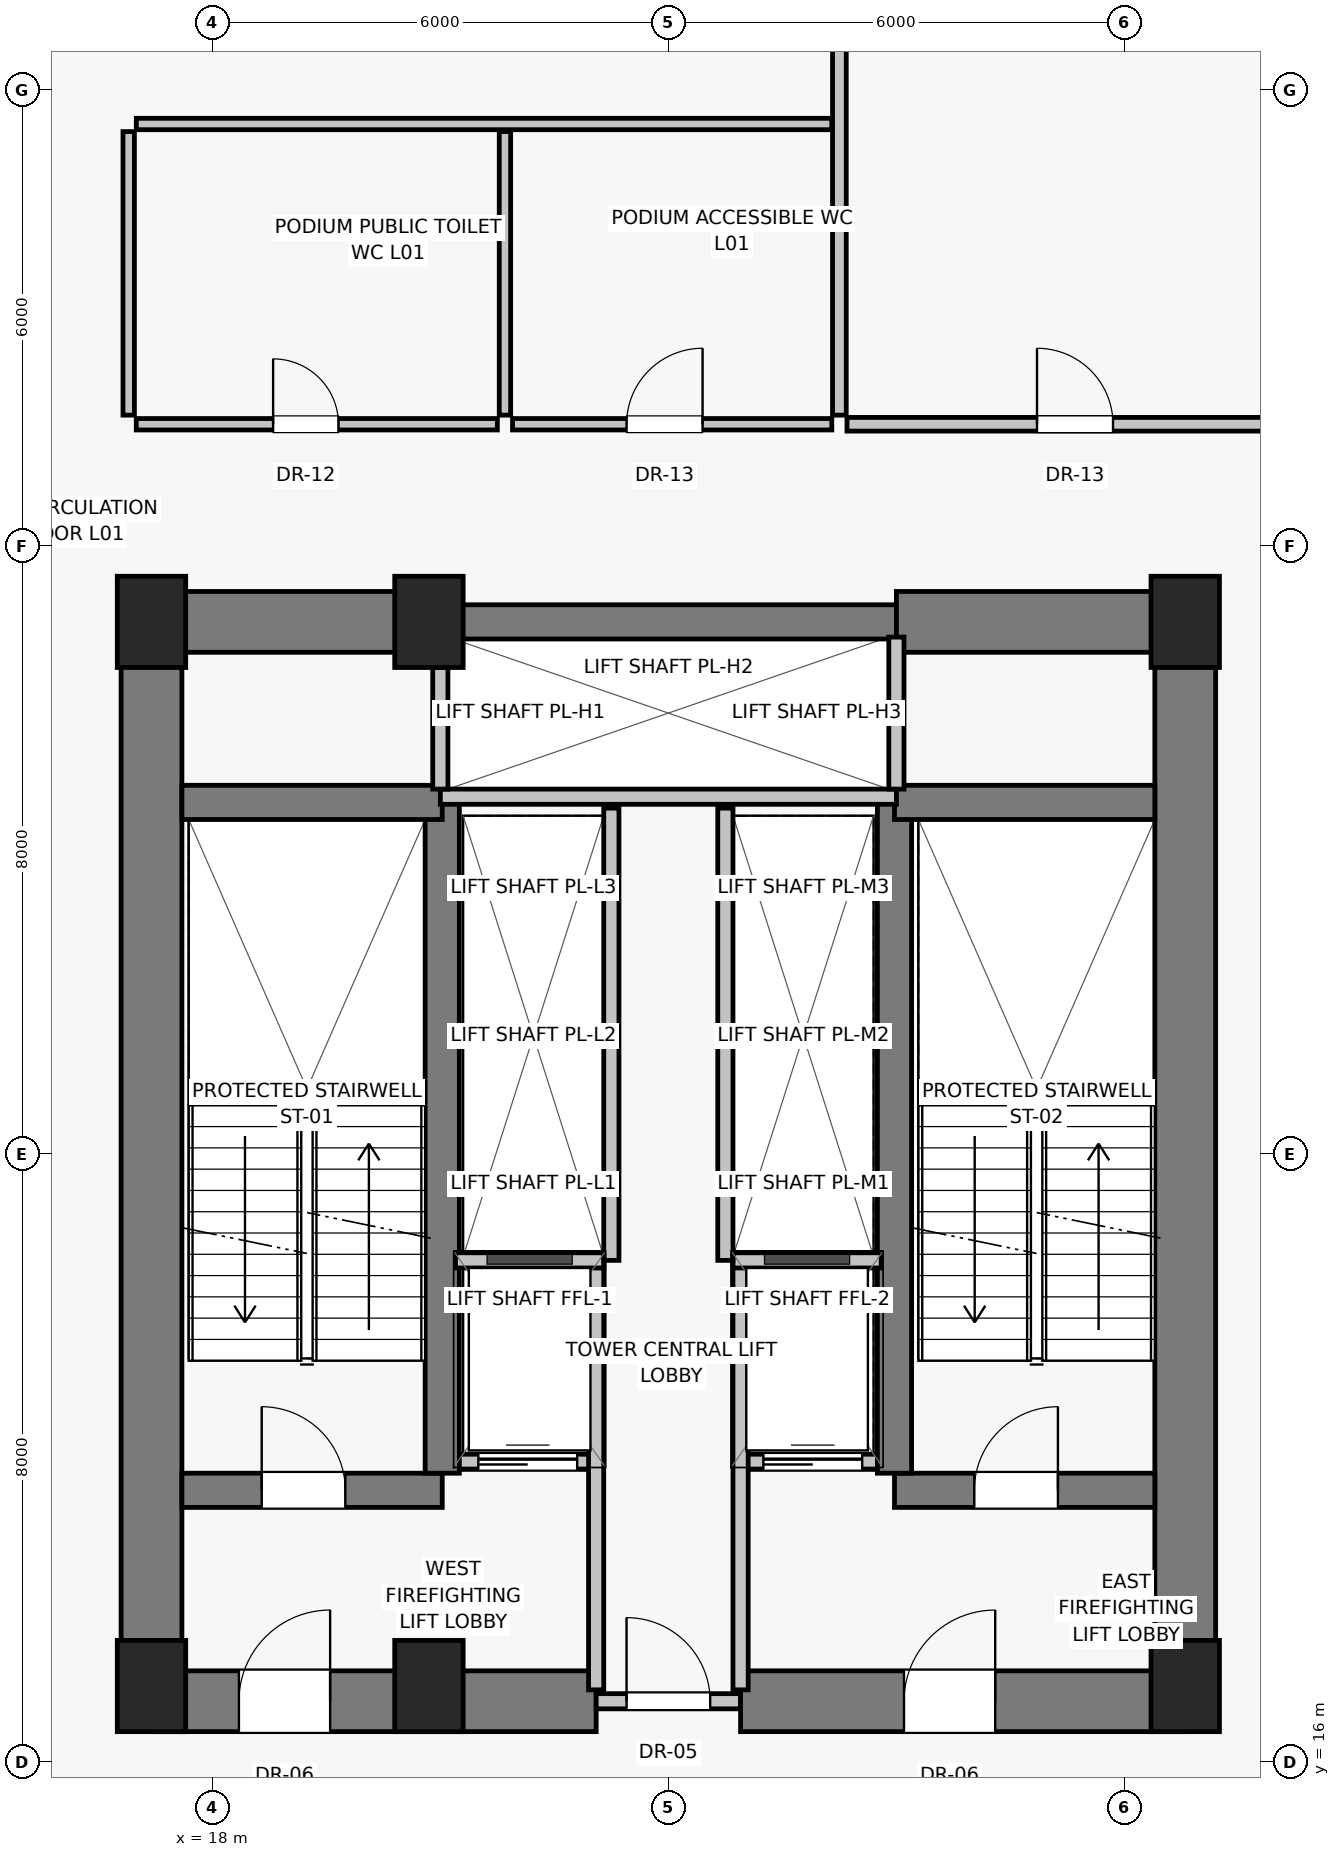
"""IFC4 building model, lengths in metres.
Left out: names, types, materials, properties, quantities, classifications, styles, units other than length and angle.
Written with IfcOpenShell. Run it as: python <this file> out.ifc"""

import sys

from ifc_helpers import new_model, si_unit, direction, frame, frame_2d, origin, origin_2d, place, context, subcontext, project, spatial, rectangle, extrude, source, transform, mapped, element, fill, save


model = new_model("IFC4")
c1 = context("Model", 3, precision=1e-05, world=origin(), true_north=direction((0.0, 1.0)))
c2 = subcontext(c1, "Body", "Model", "MODEL_VIEW")
j1 = project(units=[si_unit("LENGTHUNIT", "METRE"), si_unit("PLANEANGLEUNIT", "RADIAN")], contexts=[c1])
p1 = place(None, origin())
s1 = spatial("IfcSite", under=j1, at=p1, CompositionType="ELEMENT")
p2 = place(p1, origin())
s2 = spatial("IfcBuilding", under=s1, at=p2, CompositionType="ELEMENT")
p3 = place(p2, frame((0.0, 0.0, 5.2)))
s3 = spatial("IfcBuildingStorey", under=s2, at=p3, CompositionType="ELEMENT", Elevation=5.2)
for number, where, z_axis, x_axis in (
    (1, (17.2, 17.0, 0.0), (0.0, 0.0, 1.0), (1.0, 0.0, 0.0)),
    (2, (20.85, 17.0, 0.0), (0.0, 0.0, 1.0), (1.0, 0.0, 0.0)),
    (3, (30.8, 17.0, 0.0), (0.0, 0.0, 1.0), (1.0, 0.0, 0.0)),
    (4, (17.2, 31.0, 0.0), (0.0, 0.0, 1.0), (1.0, 0.0, 0.0)),
    (5, (20.85, 31.0, 0.0), (0.0, 0.0, 1.0), (1.0, 0.0, 0.0)),
    (6, (30.8, 31.0, 0.0), (0.0, 0.0, 1.0), (1.0, 0.0, 0.0)),
):
    element("IfcColumn", number, at=place(p3, frame(where, z_axis=z_axis, x_axis=x_axis)), inside=s3, PredefinedType="PILASTER", context=c2, shape_type="SweptSolid", body=[
        extrude(rectangle(XDim=0.9, YDim=1.2, at=origin_2d()), origin(), (0.0, 0.0, 1.0), 4.4),
    ])
for number, where, z_axis, x_axis in (
    (7, (17.2, 16.8, 0.0), (0.0, 0.0, 1.0), (0.0, 1.0, 0.0)),
    (8, (30.8, 16.8, 0.0), (0.0, 0.0, 1.0), (0.0, 1.0, 0.0)),
):
    element("IfcWall", number, at=place(p3, frame(where, z_axis=z_axis, x_axis=x_axis)), inside=s3, PredefinedType="SHEAR", context=c2, shape_type="SweptSolid", body=[
        extrude(rectangle(XDim=14.2, YDim=0.8, at=frame_2d((7.1, 0.0))), origin(), (0.0, 0.0, 1.0), 4.1),
    ])
p4 = place(p3, frame((17.2, 16.8, 0.0), z_axis=(0.0, 0.0, 1.0), x_axis=(1.0, 0.0, 0.0)))
e9 = element("IfcWall", 9, at=p4, inside=s3, PredefinedType="SHEAR", context=c2, shape_type="SweptSolid", body=[
    extrude(rectangle(XDim=5.85, YDim=0.8, at=frame_2d((2.925, 0.0))), origin(), (0.0, 0.0, 1.0), 4.1),
])
p5 = place(p4, frame((1.15, 0.0, 0.0)))
e10 = element("IfcOpeningElement", 10, at=p5, cuts=e9, PredefinedType="OPENING", context=c2, shape_type="SweptSolid", body=[
    extrude(rectangle(XDim=1.2, YDim=2.03, at=frame_2d((0.6, 1.015))), frame((0.0, 0.41, 0.0), z_axis=(0.0, -1.0, 0.0), x_axis=(1.0, 0.0, 0.0)), (0.0, 0.0, 1.0), 0.82),
])
p6 = place(p3, frame((23.05, 16.8, 0.0), z_axis=(0.0, 0.0, 1.0), x_axis=(1.0, 0.0, 0.0)))
e11 = element("IfcWall", 11, at=p6, inside=s3, PredefinedType="SOLIDWALL", context=c2, shape_type="SweptSolid", body=[
    extrude(rectangle(XDim=1.9, YDim=0.2, at=frame_2d((0.95, 0.0))), origin(), (0.0, 0.0, 1.0), 3.25),
])
p7 = place(p6, frame((0.4, 0.0, 0.0)))
e12 = element("IfcOpeningElement", 12, at=p7, cuts=e11, PredefinedType="OPENING", context=c2, shape_type="SweptSolid", body=[
    extrude(rectangle(XDim=1.1, YDim=2.03, at=frame_2d((0.55, 1.015))), frame((0.0, 0.11, 0.0), z_axis=(0.0, -1.0, 0.0), x_axis=(1.0, 0.0, 0.0)), (0.0, 0.0, 1.0), 0.22),
])
p8 = place(p3, frame((24.95, 16.8, 0.0), z_axis=(0.0, 0.0, 1.0), x_axis=(1.0, 0.0, 0.0)))
e13 = element("IfcWall", 13, at=p8, inside=s3, PredefinedType="SHEAR", context=c2, shape_type="SweptSolid", body=[
    extrude(rectangle(XDim=5.85, YDim=0.8, at=frame_2d((2.925, 0.0))), origin(), (0.0, 0.0, 1.0), 4.1),
])
p9 = place(p8, frame((2.15, 0.0, 0.0)))
e14 = element("IfcOpeningElement", 14, at=p9, cuts=e13, PredefinedType="OPENING", context=c2, shape_type="SweptSolid", body=[
    extrude(rectangle(XDim=1.2, YDim=2.03, at=frame_2d((0.6, 1.015))), frame((0.0, 0.41, 0.0), z_axis=(0.0, -1.0, 0.0), x_axis=(1.0, 0.0, 0.0)), (0.0, 0.0, 1.0), 0.82),
])
p10 = place(p3, frame((17.2, 31.0, 0.0), z_axis=(0.0, 0.0, 1.0), x_axis=(1.0, 0.0, 0.0)))
e15 = element("IfcWall", 15, at=p10, inside=s3, PredefinedType="SHEAR", context=c2, shape_type="SweptSolid", body=[
    extrude(rectangle(XDim=3.8, YDim=0.8, at=frame_2d((1.9, 0.0))), origin(), (0.0, 0.0, 1.0), 4.1),
])
p11 = place(p3, frame((21.0, 31.0, 0.0), z_axis=(0.0, 0.0, 1.0), x_axis=(1.0, 0.0, 0.0)))
e16 = element("IfcWall", 16, at=p11, inside=s3, PredefinedType="SHEAR", context=c2, shape_type="SweptSolid", body=[
    extrude(rectangle(XDim=6.0, YDim=0.45, at=frame_2d((3.0, 0.0))), origin(), (0.0, 0.0, 1.0), 4.1),
])
p12 = place(p3, frame((27.0, 31.0, 0.0), z_axis=(0.0, 0.0, 1.0), x_axis=(1.0, 0.0, 0.0)))
e17 = element("IfcWall", 17, at=p12, inside=s3, PredefinedType="SHEAR", context=c2, shape_type="SweptSolid", body=[
    extrude(rectangle(XDim=3.8, YDim=0.8, at=frame_2d((1.9, 0.0))), origin(), (0.0, 0.0, 1.0), 4.1),
])
p13 = place(p3, frame((17.6, 19.575, 0.0), z_axis=(0.0, 0.0, 1.0), x_axis=(1.0, 0.0, 0.0)))
e18 = element("IfcWall", 18, at=p13, inside=s3, PredefinedType="SHEAR", context=c2, shape_type="SweptSolid", body=[
    extrude(rectangle(XDim=3.425, YDim=0.45, at=frame_2d((1.712, 0.0))), origin(), (0.0, 0.0, 1.0), 4.1),
])
p14 = place(p13, frame((1.05, 0.0, 0.0)))
e19 = element("IfcOpeningElement", 19, at=p14, cuts=e18, PredefinedType="OPENING", context=c2, shape_type="SweptSolid", body=[
    extrude(rectangle(XDim=1.1, YDim=2.03, at=frame_2d((0.55, 1.015))), frame((0.0, 0.235, 0.0), z_axis=(0.0, -1.0, 0.0), x_axis=(1.0, 0.0, 0.0)), (0.0, 0.0, 1.0), 0.47),
])
p15 = place(p3, frame((21.2, 19.95, 0.0), z_axis=(0.0, 0.0, 1.0), x_axis=(1.0, 0.0, 0.0)))
e20 = element("IfcWall", 20, at=p15, inside=s3, PredefinedType="SOLIDWALL", context=c2, shape_type="SweptSolid", body=[
    extrude(rectangle(XDim=1.85, YDim=0.2, at=frame_2d((0.925, 0.0))), origin(), (0.0, 0.0, 1.0), 4.1),
])
p16 = place(p15, frame((0.3, 0.0, 0.0)))
e21 = element("IfcOpeningElement", 21, at=p16, cuts=e20, PredefinedType="OPENING", context=c2, shape_type="SweptSolid", body=[
    extrude(rectangle(XDim=1.3, YDim=2.25, at=frame_2d((0.65, 1.125))), frame((0.0, 0.11, 0.0), z_axis=(0.0, -1.0, 0.0), x_axis=(1.0, 0.0, 0.0)), (0.0, 0.0, 1.0), 0.22),
])
p17 = place(p3, frame((24.95, 19.95, 0.0), z_axis=(0.0, 0.0, 1.0), x_axis=(1.0, 0.0, 0.0)))
e22 = element("IfcWall", 22, at=p17, inside=s3, PredefinedType="SOLIDWALL", context=c2, shape_type="SweptSolid", body=[
    extrude(rectangle(XDim=1.85, YDim=0.2, at=frame_2d((0.925, 0.0))), origin(), (0.0, 0.0, 1.0), 4.1),
])
p18 = place(p17, frame((0.3, 0.0, 0.0)))
e23 = element("IfcOpeningElement", 23, at=p18, cuts=e22, PredefinedType="OPENING", context=c2, shape_type="SweptSolid", body=[
    extrude(rectangle(XDim=1.3, YDim=2.25, at=frame_2d((0.65, 1.125))), frame((0.0, 0.11, 0.0), z_axis=(0.0, -1.0, 0.0), x_axis=(1.0, 0.0, 0.0)), (0.0, 0.0, 1.0), 0.22),
])
p19 = place(p3, frame((26.975, 19.575, 0.0), z_axis=(0.0, 0.0, 1.0), x_axis=(1.0, 0.0, 0.0)))
e24 = element("IfcWall", 24, at=p19, inside=s3, PredefinedType="SHEAR", context=c2, shape_type="SweptSolid", body=[
    extrude(rectangle(XDim=3.425, YDim=0.45, at=frame_2d((1.712, 0.0))), origin(), (0.0, 0.0, 1.0), 4.1),
])
p20 = place(p19, frame((1.05, 0.0, 0.0)))
e25 = element("IfcOpeningElement", 25, at=p20, cuts=e24, PredefinedType="OPENING", context=c2, shape_type="SweptSolid", body=[
    extrude(rectangle(XDim=1.1, YDim=2.03, at=frame_2d((0.55, 1.015))), frame((0.0, 0.235, 0.0), z_axis=(0.0, -1.0, 0.0), x_axis=(1.0, 0.0, 0.0)), (0.0, 0.0, 1.0), 0.47),
])
for number, where, z_axis, x_axis in (
    (26, (21.025, 19.8, 0.0), (0.0, 0.0, 1.0), (0.0, 1.0, 0.0)),
    (27, (26.975, 19.8, 0.0), (0.0, 0.0, 1.0), (0.0, 1.0, 0.0)),
):
    element("IfcWall", number, at=place(p3, frame(where, z_axis=z_axis, x_axis=x_axis)), inside=s3, PredefinedType="SHEAR", context=c2, shape_type="SweptSolid", body=[
        extrude(rectangle(XDim=8.825, YDim=0.45, at=frame_2d((4.413, 0.0))), origin(), (0.0, 0.0, 1.0), 4.1),
    ])
for number, where, z_axis, x_axis in (
    (28, (17.6, 28.625, 0.0), (0.0, 0.0, 1.0), (1.0, 0.0, 0.0)),
    (29, (26.975, 28.625, 0.0), (0.0, 0.0, 1.0), (1.0, 0.0, 0.0)),
):
    element("IfcWall", number, at=place(p3, frame(where, z_axis=z_axis, x_axis=x_axis)), inside=s3, PredefinedType="SHEAR", context=c2, shape_type="SweptSolid", body=[
        extrude(rectangle(XDim=3.425, YDim=0.45, at=frame_2d((1.712, 0.0))), origin(), (0.0, 0.0, 1.0), 4.1),
    ])
for number, where, z_axis, x_axis in (
    (30, (23.05, 16.95, 0.0), (0.0, 0.0, 1.0), (0.0, 1.0, 0.0)),
    (31, (24.95, 16.95, 0.0), (0.0, 0.0, 1.0), (0.0, 1.0, 0.0)),
):
    element("IfcWall", number, at=place(p3, frame(where, z_axis=z_axis, x_axis=x_axis)), inside=s3, PredefinedType="SOLIDWALL", context=c2, shape_type="SweptSolid", body=[
        extrude(rectangle(XDim=5.6, YDim=0.2, at=frame_2d((2.8, 0.0))), origin(), (0.0, 0.0, 1.0), 4.1),
    ])
for number, where, z_axis, x_axis in (
    (32, (21.2, 22.6, 0.0), (0.0, 0.0, 1.0), (1.0, 0.0, 0.0)),
    (33, (24.85, 22.6, 0.0), (0.0, 0.0, 1.0), (1.0, 0.0, 0.0)),
):
    element("IfcWall", number, at=place(p3, frame(where, z_axis=z_axis, x_axis=x_axis)), inside=s3, PredefinedType="SOLIDWALL", context=c2, shape_type="SweptSolid", body=[
        extrude(rectangle(XDim=1.95, YDim=0.2, at=frame_2d((0.975, 0.0))), origin(), (0.0, 0.0, 1.0), 4.1),
    ])
p21 = place(p3, frame((21.0, 28.7, 0.0), z_axis=(0.0, 0.0, 1.0), x_axis=(1.0, 0.0, 0.0)))
e34 = element("IfcWall", 34, at=p21, inside=s3, PredefinedType="SOLIDWALL", context=c2, shape_type="SweptSolid", body=[
    extrude(rectangle(XDim=6.0, YDim=0.2, at=frame_2d((3.0, 0.0))), origin(), (0.0, 0.0, 1.0), 4.1),
])
p22 = place(p3, frame((21.0, 28.8, 0.0), z_axis=(0.0, 0.0, 1.0), x_axis=(0.0, 1.0, 0.0)))
e35 = element("IfcWall", 35, at=p22, inside=s3, PredefinedType="SOLIDWALL", context=c2, shape_type="SweptSolid", body=[
    extrude(rectangle(XDim=1.6, YDim=0.2, at=frame_2d((0.8, 0.0))), origin(), (0.0, 0.0, 1.0), 4.1),
])
p23 = place(p3, frame((27.0, 28.8, 0.0), z_axis=(0.0, 0.0, 1.0), x_axis=(0.0, 1.0, 0.0)))
e36 = element("IfcWall", 36, at=p23, inside=s3, PredefinedType="SOLIDWALL", context=c2, shape_type="SweptSolid", body=[
    extrude(rectangle(XDim=2.0, YDim=0.2, at=frame_2d((1.0, 0.0))), origin(), (0.0, 0.0, 1.0), 4.1),
])
for number, where, z_axis, x_axis in (
    (37, (23.25, 22.6, 0.0), (0.0, 0.0, 1.0), (0.0, 1.0, 0.0)),
    (38, (24.75, 22.6, 0.0), (0.0, 0.0, 1.0), (0.0, 1.0, 0.0)),
):
    element("IfcWall", number, at=place(p3, frame(where, z_axis=z_axis, x_axis=x_axis)), inside=s3, PredefinedType="SOLIDWALL", context=c2, shape_type="SweptSolid", body=[
        extrude(rectangle(XDim=5.95, YDim=0.2, at=frame_2d((2.975, 0.0))), origin(), (0.0, 0.0, 1.0), 4.1),
    ])
p24 = place(p3, frame((17.0, 33.6, 0.0), z_axis=(0.0, 0.0, 1.0), x_axis=(1.0, 0.0, 0.0)))
e39 = element("IfcWall", 39, at=p24, inside=s3, PredefinedType="PARTITIONING", context=c2, shape_type="SweptSolid", body=[
    extrude(rectangle(XDim=4.75, YDim=0.15, at=frame_2d((2.375, 0.0))), origin(), (0.0, 0.0, 1.0), 4.1),
])
p25 = place(p24, frame((1.8, 0.0, 0.0)))
e40 = element("IfcOpeningElement", 40, at=p25, cuts=e39, PredefinedType="OPENING", context=c2, shape_type="SweptSolid", body=[
    extrude(rectangle(XDim=0.86, YDim=2.01, at=frame_2d((0.43, 1.005))), frame((0.0, 0.085, 0.0), z_axis=(0.0, -1.0, 0.0), x_axis=(1.0, 0.0, 0.0)), (0.0, 0.0, 1.0), 0.17),
])
p26 = place(p3, frame((21.95, 33.6, 0.0), z_axis=(0.0, 0.0, 1.0), x_axis=(1.0, 0.0, 0.0)))
e41 = element("IfcWall", 41, at=p26, inside=s3, PredefinedType="PARTITIONING", context=c2, shape_type="SweptSolid", body=[
    extrude(rectangle(XDim=4.2, YDim=0.15, at=frame_2d((2.1, 0.0))), origin(), (0.0, 0.0, 1.0), 4.1),
])
p27 = place(p26, frame((1.5, 0.0, 0.0)))
e42 = element("IfcOpeningElement", 42, at=p27, cuts=e41, PredefinedType="OPENING", context=c2, shape_type="SweptSolid", body=[
    extrude(rectangle(XDim=1.0, YDim=2.01, at=frame_2d((0.5, 1.005))), frame((0.0, 0.085, 0.0), z_axis=(0.0, -1.0, 0.0), x_axis=(1.0, 0.0, 0.0)), (0.0, 0.0, 1.0), 0.17),
])
p28 = place(p3, frame((26.35, 33.6, 0.0), z_axis=(0.0, 0.0, 1.0), x_axis=(1.0, 0.0, 0.0)))
e43 = element("IfcWall", 43, at=p28, inside=s3, PredefinedType="PARTITIONING", context=c2, shape_type="SweptSolid", body=[
    extrude(rectangle(XDim=6.9, YDim=0.18, at=frame_2d((3.45, 0.0))), origin(), (0.0, 0.0, 1.0), 4.1),
])
p29 = place(p28, frame((2.5, 0.0, 0.0)))
e44 = element("IfcOpeningElement", 44, at=p29, cuts=e43, PredefinedType="OPENING", context=c2, shape_type="SweptSolid", body=[
    extrude(rectangle(XDim=1.0, YDim=2.01, at=frame_2d((0.5, 1.005))), frame((0.0, 0.1, 0.0), z_axis=(0.0, -1.0, 0.0), x_axis=(1.0, 0.0, 0.0)), (0.0, 0.0, 1.0), 0.2),
])
for number, where, z_axis, x_axis in (
    (45, (16.9, 33.72, 0.0), (0.0, 0.0, 1.0), (0.0, 1.0, 0.0)),
    (46, (21.85, 33.72, 0.0), (0.0, 0.0, 1.0), (0.0, 1.0, 0.0)),
):
    element("IfcWall", number, at=place(p3, frame(where, z_axis=z_axis, x_axis=x_axis)), inside=s3, PredefinedType="PARTITIONING", context=c2, shape_type="SweptSolid", body=[
        extrude(rectangle(XDim=3.73, YDim=0.15, at=frame_2d((1.865, 0.0))), origin(), (0.0, 0.0, 1.0), 4.1),
    ])
p30 = place(p3, frame((26.25, 33.72, 0.0), z_axis=(0.0, 0.0, 1.0), x_axis=(0.0, 1.0, 0.0)))
e47 = element("IfcWall", 47, at=p30, inside=s3, PredefinedType="PARTITIONING", context=c2, shape_type="SweptSolid", body=[
    extrude(rectangle(XDim=12.06, YDim=0.18, at=frame_2d((6.03, 0.0))), origin(), (0.0, 0.0, 1.0), 4.1),
])
p31 = place(p3, frame((17.0, 37.55, 0.0), z_axis=(0.0, 0.0, 1.0), x_axis=(1.0, 0.0, 0.0)))
e48 = element("IfcWall", 48, at=p31, inside=s3, PredefinedType="PARTITIONING", context=c2, shape_type="SweptSolid", body=[
    extrude(rectangle(XDim=9.15, YDim=0.15, at=frame_2d((4.575, 0.0))), origin(), (0.0, 0.0, 1.0), 4.1),
])
m1 = source(origin(), c2, "Body", "SweptSolid", [
    extrude(rectangle(XDim=1.2, YDim=2.03, at=frame_2d((0.6, 1.015))), frame((0.0, 0.025, 0.0), z_axis=(0.0, -1.0, 0.0), x_axis=(1.0, 0.0, 0.0)), (0.0, 0.0, 1.0), 0.05),
])
p32 = place(p5, origin())
e49 = element("IfcDoor", 49, at=p32, inside=s3, OperationType="SINGLE_SWING_RIGHT", PredefinedType="DOOR", context=c2, shape_type="MappedRepresentation", body=[
    mapped(m1, transform((0.0, 0.0, 0.0), scale=1.0)),
])
fill(e10, e49)
m2 = source(origin(), c2, "Body", "SweptSolid", [
    extrude(rectangle(XDim=1.1, YDim=2.03, at=frame_2d((0.55, 1.015))), frame((0.0, 0.025, 0.0), z_axis=(0.0, -1.0, 0.0), x_axis=(1.0, 0.0, 0.0)), (0.0, 0.0, 1.0), 0.05),
])
p33 = place(p7, origin())
e50 = element("IfcDoor", 50, at=p33, inside=s3, OperationType="SINGLE_SWING_LEFT", PredefinedType="DOOR", context=c2, shape_type="MappedRepresentation", body=[
    mapped(m2, transform((0.0, 0.0, 0.0), scale=1.0)),
])
fill(e12, e50)
p34 = place(p9, origin())
e51 = element("IfcDoor", 51, at=p34, inside=s3, OperationType="SINGLE_SWING_RIGHT", PredefinedType="DOOR", context=c2, shape_type="MappedRepresentation", body=[
    mapped(m1, transform((0.0, 0.0, 0.0), scale=1.0)),
])
fill(e14, e51)
p35 = place(p14, origin())
e52 = element("IfcDoor", 52, at=p35, inside=s3, OperationType="SINGLE_SWING_LEFT", PredefinedType="DOOR", context=c2, shape_type="MappedRepresentation", body=[
    mapped(m2, transform((0.0, 0.0, 0.0), scale=1.0)),
])
fill(e19, e52)
m3 = source(origin(), c2, "Body", "SweptSolid", [
    extrude(rectangle(XDim=1.3, YDim=2.25, at=frame_2d((0.65, 1.125))), frame((0.0, 0.025, 0.0), z_axis=(0.0, -1.0, 0.0), x_axis=(1.0, 0.0, 0.0)), (0.0, 0.0, 1.0), 0.05),
])
p36 = place(p16, origin())
e53 = element("IfcDoor", 53, at=p36, inside=s3, OperationType="SLIDING_TO_LEFT", PredefinedType="DOOR", context=c2, shape_type="MappedRepresentation", body=[
    mapped(m3, transform((0.0, 0.0, 0.0), scale=1.0)),
])
fill(e21, e53)
p37 = place(p18, origin())
e54 = element("IfcDoor", 54, at=p37, inside=s3, OperationType="SLIDING_TO_LEFT", PredefinedType="DOOR", context=c2, shape_type="MappedRepresentation", body=[
    mapped(m3, transform((0.0, 0.0, 0.0), scale=1.0)),
])
fill(e23, e54)
p38 = place(p20, origin())
e55 = element("IfcDoor", 55, at=p38, inside=s3, OperationType="SINGLE_SWING_RIGHT", PredefinedType="DOOR", context=c2, shape_type="MappedRepresentation", body=[
    mapped(m2, transform((0.0, 0.0, 0.0), scale=1.0)),
])
fill(e25, e55)
m4 = source(origin(), c2, "Body", "SweptSolid", [
    extrude(rectangle(XDim=0.86, YDim=2.01, at=frame_2d((0.43, 1.005))), frame((0.0, 0.025, 0.0), z_axis=(0.0, -1.0, 0.0), x_axis=(1.0, 0.0, 0.0)), (0.0, 0.0, 1.0), 0.05),
])
p39 = place(p25, origin())
e56 = element("IfcDoor", 56, at=p39, inside=s3, OperationType="SINGLE_SWING_LEFT", PredefinedType="DOOR", context=c2, shape_type="MappedRepresentation", body=[
    mapped(m4, transform((0.0, 0.0, 0.0), scale=1.0)),
])
fill(e40, e56)
m5 = source(origin(), c2, "Body", "SweptSolid", [
    extrude(rectangle(XDim=1.0, YDim=2.01, at=frame_2d((0.5, 1.005))), frame((0.0, 0.025, 0.0), z_axis=(0.0, -1.0, 0.0), x_axis=(1.0, 0.0, 0.0)), (0.0, 0.0, 1.0), 0.05),
])
p40 = place(p27, origin())
e57 = element("IfcDoor", 57, at=p40, inside=s3, OperationType="SINGLE_SWING_RIGHT", PredefinedType="DOOR", context=c2, shape_type="MappedRepresentation", body=[
    mapped(m5, transform((0.0, 0.0, 0.0), scale=1.0)),
])
fill(e42, e57)
p41 = place(p29, origin())
e58 = element("IfcDoor", 58, at=p41, inside=s3, OperationType="SINGLE_SWING_LEFT", PredefinedType="DOOR", context=c2, shape_type="MappedRepresentation", body=[
    mapped(m5, transform((0.0, 0.0, 0.0), scale=1.0)),
])
fill(e44, e58)
save(model, sys.argv[1])
